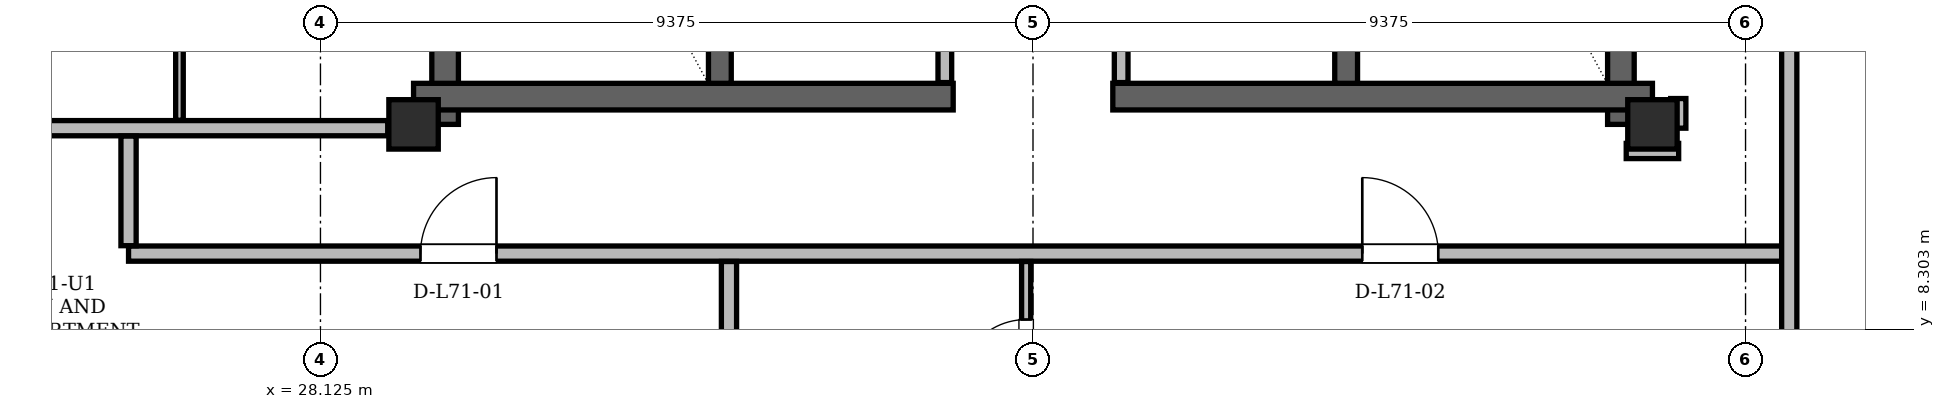
"""IFC4 building model, lengths in metres.
Left out: names, types, materials, properties, quantities, classifications, styles, units other than length and angle.
Written with IfcOpenShell. Run it as: python <this file> out.ifc"""

import sys

from ifc_helpers import new_model, si_unit, direction, frame, frame_2d, origin, origin_2d, place, context, subcontext, project, spatial, rectangle, hollow_rectangle, extrude, element, fill, save


model = new_model("IFC4")
c1 = context("Model", 3, precision=1e-05, world=origin(), true_north=direction((0.0, 1.0)))
c2 = subcontext(c1, "Body", "Model", "MODEL_VIEW")
j1 = project(units=[si_unit("LENGTHUNIT", "METRE"), si_unit("PLANEANGLEUNIT", "RADIAN")], contexts=[c1])
p1 = place(None, origin())
s1 = spatial("IfcSite", under=j1, at=p1, CompositionType="ELEMENT")
p2 = place(p1, origin())
s2 = spatial("IfcBuilding", under=s1, at=p2, CompositionType="ELEMENT")
p3 = place(p2, frame((0.0, 0.0, 269.4)))
s3 = spatial("IfcBuildingStorey", under=s2, at=p3, CompositionType="ELEMENT", Elevation=269.4)
for number, where, z_axis, x_axis in (
    (1, (29.35, 11.0, 0.0), (0.0, 0.0, 1.0), (1.0, 0.0, 0.0)),
    (2, (45.65, 11.0, 0.0), (0.0, 0.0, 1.0), (1.0, 0.0, 0.0)),
):
    element("IfcColumn", number, at=place(p3, frame(where, z_axis=z_axis, x_axis=x_axis)), inside=s3, PredefinedType="COLUMN", context=c2, shape_type="SweptSolid", body=[
        extrude(hollow_rectangle(XDim=0.65, YDim=0.65, WallThickness=0.05, at=origin_2d()), origin(), (0.0, 0.0, 1.0), 3.9),
    ])
for number, where, z_axis, x_axis in (
    (3, (29.765, 11.0, 0.0), (0.0, 0.0, 1.0), (0.0, 1.0, 0.0)),
    (4, (45.235, 11.0, 0.0), (0.0, 0.0, 1.0), (0.0, 1.0, 0.0)),
):
    element("IfcWall", number, at=place(p3, frame(where, z_axis=z_axis, x_axis=x_axis)), inside=s3, PredefinedType="SHEAR", context=c2, shape_type="SweptSolid", body=[
        extrude(rectangle(XDim=13.3, YDim=0.35, at=frame_2d((6.65, 0.0))), origin(), (0.0, 0.0, 1.0), 3.68),
    ])
for number, where, z_axis, x_axis in (
    (5, (29.35, 11.365, 0.0), (0.0, 0.0, 1.0), (1.0, 0.0, 0.0)),
    (6, (38.55, 11.365, 0.0), (0.0, 0.0, 1.0), (1.0, 0.0, 0.0)),
):
    element("IfcWall", number, at=place(p3, frame(where, z_axis=z_axis, x_axis=x_axis)), inside=s3, PredefinedType="SHEAR", context=c2, shape_type="SweptSolid", body=[
        extrude(rectangle(XDim=7.1, YDim=0.35, at=frame_2d((3.55, 0.0))), origin(), (0.0, 0.0, 1.0), 3.68),
    ])
for number, where, z_axis, x_axis in (
    (7, (33.38, 11.54, 0.0), (0.0, 0.0, 1.0), (0.0, 1.0, 0.0)),
    (8, (41.62, 11.54, 0.0), (0.0, 0.0, 1.0), (0.0, 1.0, 0.0)),
):
    element("IfcWall", number, at=place(p3, frame(where, z_axis=z_axis, x_axis=x_axis)), inside=s3, PredefinedType="SHEAR", context=c2, shape_type="SweptSolid", body=[
        extrude(rectangle(XDim=7.62, YDim=0.3, at=frame_2d((3.81, 0.0))), origin(), (0.0, 0.0, 1.0), 3.68),
    ])
p4 = place(p3, frame((58.572, 10.733, 0.0), z_axis=(0.0, 0.0, 1.0), x_axis=(-0.500001430823, 0.866024577697, 0.0)))
e9 = element("IfcWall", 9, at=p4, inside=s3, PredefinedType="SOLIDWALL", context=c2, shape_type="SweptSolid", body=[
    extrude(rectangle(XDim=37.296, YDim=0.29, at=frame_2d((18.648, 0.0))), origin(), (0.0, 0.0, 1.0), 3.058),
])
p5 = place(p4, frame((8.454, 0.0, 0.0)))
e10 = element("IfcOpeningElement", 10, at=p5, cuts=e9, PredefinedType="OPENING", context=c2, shape_type="SweptSolid", body=[
    extrude(rectangle(XDim=1.5, YDim=2.2, at=frame_2d((0.75, 1.1))), frame((0.0, 0.145, 0.0), z_axis=(0.0, -1.0, 0.0), x_axis=(1.0, 0.0, 0.0)), (0.0, 0.0, 1.0), 0.29),
])
p6 = place(p4, frame((28.796, 0.0, 0.0)))
e11 = element("IfcOpeningElement", 11, at=p6, cuts=e9, PredefinedType="OPENING", context=c2, shape_type="SweptSolid", body=[
    extrude(rectangle(XDim=1.5, YDim=2.2, at=frame_2d((0.75, 1.1))), frame((0.0, 0.145, 0.0), z_axis=(0.0, -1.0, 0.0), x_axis=(1.0, 0.0, 0.0)), (0.0, 0.0, 1.0), 0.29),
])
p7 = place(p4, frame((0.77, 0.0, 0.85)))
e12 = element("IfcOpeningElement", 12, at=p7, cuts=e9, PredefinedType="OPENING", context=c2, shape_type="SweptSolid", body=[
    extrude(rectangle(XDim=1.2, YDim=1.48, at=frame_2d((0.6, 0.74))), frame((0.0, 0.145, 0.0), z_axis=(0.0, -1.0, 0.0), x_axis=(1.0, 0.0, 0.0)), (0.0, 0.0, 1.0), 0.29),
])
p8 = place(p4, frame((2.285, 0.0, 0.85)))
e13 = element("IfcOpeningElement", 13, at=p8, cuts=e9, PredefinedType="OPENING", context=c2, shape_type="SweptSolid", body=[
    extrude(rectangle(XDim=1.2, YDim=1.48, at=frame_2d((0.6, 0.74))), frame((0.0, 0.145, 0.0), z_axis=(0.0, -1.0, 0.0), x_axis=(1.0, 0.0, 0.0)), (0.0, 0.0, 1.0), 0.29),
])
p9 = place(p4, frame((6.772, 0.0, 0.85)))
e14 = element("IfcOpeningElement", 14, at=p9, cuts=e9, PredefinedType="OPENING", context=c2, shape_type="SweptSolid", body=[
    extrude(rectangle(XDim=1.2, YDim=1.48, at=frame_2d((0.6, 0.74))), frame((0.0, 0.145, 0.0), z_axis=(0.0, -1.0, 0.0), x_axis=(1.0, 0.0, 0.0)), (0.0, 0.0, 1.0), 0.29),
])
p10 = place(p4, frame((12.682, 0.0, 0.85)))
e15 = element("IfcOpeningElement", 15, at=p10, cuts=e9, PredefinedType="OPENING", context=c2, shape_type="SweptSolid", body=[
    extrude(rectangle(XDim=3.0, YDim=2.098, at=frame_2d((1.5, 1.049))), frame((0.0, 0.145, 0.0), z_axis=(0.0, -1.0, 0.0), x_axis=(1.0, 0.0, 0.0)), (0.0, 0.0, 1.0), 0.29),
])
p11 = place(p4, frame((17.842, 0.0, 0.85)))
e16 = element("IfcOpeningElement", 16, at=p11, cuts=e9, PredefinedType="OPENING", context=c2, shape_type="SweptSolid", body=[
    extrude(rectangle(XDim=2.6, YDim=1.95, at=frame_2d((1.3, 0.975))), frame((0.0, 0.145, 0.0), z_axis=(0.0, -1.0, 0.0), x_axis=(1.0, 0.0, 0.0)), (0.0, 0.0, 1.0), 0.29),
])
p12 = place(p4, frame((35.217, 0.0, 0.85)))
e17 = element("IfcOpeningElement", 17, at=p12, cuts=e9, PredefinedType="OPENING", context=c2, shape_type="SweptSolid", body=[
    extrude(rectangle(XDim=1.2, YDim=1.48, at=frame_2d((0.6, 0.74))), frame((0.0, 0.145, 0.0), z_axis=(0.0, -1.0, 0.0), x_axis=(1.0, 0.0, 0.0)), (0.0, 0.0, 1.0), 0.29),
])
p13 = place(p4, frame((33.737, 0.0, 0.85)))
e18 = element("IfcOpeningElement", 18, at=p13, cuts=e9, PredefinedType="OPENING", context=c2, shape_type="SweptSolid", body=[
    extrude(rectangle(XDim=1.2, YDim=1.48, at=frame_2d((0.6, 0.74))), frame((0.0, 0.145, 0.0), z_axis=(0.0, -1.0, 0.0), x_axis=(1.0, 0.0, 0.0)), (0.0, 0.0, 1.0), 0.29),
])
p14 = place(p4, frame((22.775, 0.0, 0.85)))
e19 = element("IfcOpeningElement", 19, at=p14, cuts=e9, PredefinedType="OPENING", context=c2, shape_type="SweptSolid", body=[
    extrude(rectangle(XDim=1.2, YDim=1.48, at=frame_2d((0.6, 0.74))), frame((0.0, 0.145, 0.0), z_axis=(0.0, -1.0, 0.0), x_axis=(1.0, 0.0, 0.0)), (0.0, 0.0, 1.0), 0.29),
])
p15 = place(p4, frame((31.663, 0.0, 0.85)))
e20 = element("IfcOpeningElement", 20, at=p15, cuts=e9, PredefinedType="OPENING", context=c2, shape_type="SweptSolid", body=[
    extrude(rectangle(XDim=1.2, YDim=1.48, at=frame_2d((0.6, 0.74))), frame((0.0, 0.145, 0.0), z_axis=(0.0, -1.0, 0.0), x_axis=(1.0, 0.0, 0.0)), (0.0, 0.0, 1.0), 0.29),
])
p16 = place(p3, frame((35.076, 43.032, 0.0), z_axis=(0.0, 0.0, 1.0), x_axis=(-0.500001430823, -0.866024577697, 0.0)))
e21 = element("IfcWall", 21, at=p16, inside=s3, PredefinedType="SOLIDWALL", context=c2, shape_type="SweptSolid", body=[
    extrude(rectangle(XDim=37.296, YDim=0.29, at=frame_2d((18.648, 0.0))), origin(), (0.0, 0.0, 1.0), 3.058),
])
p17 = place(p16, frame((8.244, 0.0, 0.0)))
e22 = element("IfcOpeningElement", 22, at=p17, cuts=e21, PredefinedType="OPENING", context=c2, shape_type="SweptSolid", body=[
    extrude(rectangle(XDim=1.5, YDim=2.2, at=frame_2d((0.75, 1.1))), frame((0.0, 0.145, 0.0), z_axis=(0.0, -1.0, 0.0), x_axis=(1.0, 0.0, 0.0)), (0.0, 0.0, 1.0), 0.29),
])
p18 = place(p16, frame((29.006, 0.0, 0.0)))
e23 = element("IfcOpeningElement", 23, at=p18, cuts=e21, PredefinedType="OPENING", context=c2, shape_type="SweptSolid", body=[
    extrude(rectangle(XDim=1.5, YDim=2.2, at=frame_2d((0.75, 1.1))), frame((0.0, 0.145, 0.0), z_axis=(0.0, -1.0, 0.0), x_axis=(1.0, 0.0, 0.0)), (0.0, 0.0, 1.0), 0.29),
])
p19 = place(p16, frame((22.292, 0.0, 0.85)))
e24 = element("IfcOpeningElement", 24, at=p19, cuts=e21, PredefinedType="OPENING", context=c2, shape_type="SweptSolid", body=[
    extrude(rectangle(XDim=2.6, YDim=1.95, at=frame_2d((1.3, 0.975))), frame((0.0, 0.145, 0.0), z_axis=(0.0, -1.0, 0.0), x_axis=(1.0, 0.0, 0.0)), (0.0, 0.0, 1.0), 0.29),
])
p20 = place(p16, frame((33.833, 0.0, 0.85)))
e25 = element("IfcOpeningElement", 25, at=p20, cuts=e21, PredefinedType="OPENING", context=c2, shape_type="SweptSolid", body=[
    extrude(rectangle(XDim=2.4, YDim=1.9, at=frame_2d((1.2, 0.95))), frame((0.0, 0.145, 0.0), z_axis=(0.0, -1.0, 0.0), x_axis=(1.0, 0.0, 0.0)), (0.0, 0.0, 1.0), 0.29),
])
p21 = place(p16, frame((12.154, 0.0, 0.85)))
e26 = element("IfcOpeningElement", 26, at=p21, cuts=e21, PredefinedType="OPENING", context=c2, shape_type="SweptSolid", body=[
    extrude(rectangle(XDim=1.2, YDim=1.48, at=frame_2d((0.6, 0.74))), frame((0.0, 0.145, 0.0), z_axis=(0.0, -1.0, 0.0), x_axis=(1.0, 0.0, 0.0)), (0.0, 0.0, 1.0), 0.29),
])
p22 = place(p16, frame((16.612, 0.0, 0.85)))
e27 = element("IfcOpeningElement", 27, at=p22, cuts=e21, PredefinedType="OPENING", context=c2, shape_type="SweptSolid", body=[
    extrude(rectangle(XDim=1.6, YDim=1.7, at=frame_2d((0.8, 0.85))), frame((0.0, 0.145, 0.0), z_axis=(0.0, -1.0, 0.0), x_axis=(1.0, 0.0, 0.0)), (0.0, 0.0, 1.0), 0.29),
])
p23 = place(p16, frame((2.665, 0.0, 0.85)))
e28 = element("IfcOpeningElement", 28, at=p23, cuts=e21, PredefinedType="OPENING", context=c2, shape_type="SweptSolid", body=[
    extrude(rectangle(XDim=2.0, YDim=1.8, at=frame_2d((1.0, 0.9))), frame((0.0, 0.145, 0.0), z_axis=(0.0, -1.0, 0.0), x_axis=(1.0, 0.0, 0.0)), (0.0, 0.0, 1.0), 0.29),
])
p24 = place(p3, frame((36.34, 11.55, 0.0), z_axis=(0.0, 0.0, 1.0), x_axis=(0.0, 1.0, 0.0)))
e29 = element("IfcWall", 29, at=p24, inside=s3, PredefinedType="PARTITIONING", context=c2, shape_type="SweptSolid", body=[
    extrude(rectangle(XDim=5.55, YDim=0.18, at=frame_2d((2.775, 0.0))), origin(), (0.0, 0.0, 1.0), 3.68),
])
p25 = place(p24, frame((0.55, 0.0, 0.0)))
e30 = element("IfcOpeningElement", 30, at=p25, cuts=e29, PredefinedType="OPENING", context=c2, shape_type="SweptSolid", body=[
    extrude(rectangle(XDim=0.88, YDim=2.08, at=frame_2d((0.44, 1.04))), frame((0.0, 0.09, 0.0), z_axis=(0.0, -1.0, 0.0), x_axis=(1.0, 0.0, 0.0)), (0.0, 0.0, 1.0), 0.18),
])
p26 = place(p24, frame((3.25, 0.0, 0.0)))
e31 = element("IfcOpeningElement", 31, at=p26, cuts=e29, PredefinedType="OPENING", context=c2, shape_type="SweptSolid", body=[
    extrude(rectangle(XDim=0.88, YDim=2.08, at=frame_2d((0.44, 1.04))), frame((0.0, 0.09, 0.0), z_axis=(0.0, -1.0, 0.0), x_axis=(1.0, 0.0, 0.0)), (0.0, 0.0, 1.0), 0.18),
])
p27 = place(p3, frame((38.66, 11.55, 0.0), z_axis=(0.0, 0.0, 1.0), x_axis=(0.0, 1.0, 0.0)))
e32 = element("IfcWall", 32, at=p27, inside=s3, PredefinedType="PARTITIONING", context=c2, shape_type="SweptSolid", body=[
    extrude(rectangle(XDim=5.55, YDim=0.18, at=frame_2d((2.775, 0.0))), origin(), (0.0, 0.0, 1.0), 3.68),
])
p28 = place(p27, frame((1.35, 0.0, 0.0)))
e33 = element("IfcOpeningElement", 33, at=p28, cuts=e32, PredefinedType="OPENING", context=c2, shape_type="SweptSolid", body=[
    extrude(rectangle(XDim=0.88, YDim=2.08, at=frame_2d((0.44, 1.04))), frame((0.0, 0.09, 0.0), z_axis=(0.0, -1.0, 0.0), x_axis=(1.0, 0.0, 0.0)), (0.0, 0.0, 1.0), 0.18),
])
p29 = place(p27, frame((4.1, 0.0, 0.0)))
e34 = element("IfcOpeningElement", 34, at=p29, cuts=e32, PredefinedType="OPENING", context=c2, shape_type="SweptSolid", body=[
    extrude(rectangle(XDim=0.88, YDim=2.08, at=frame_2d((0.44, 1.04))), frame((0.0, 0.09, 0.0), z_axis=(0.0, -1.0, 0.0), x_axis=(1.0, 0.0, 0.0)), (0.0, 0.0, 1.0), 0.18),
])
p30 = place(p3, frame((25.6, 9.3, 0.0), z_axis=(0.0, 0.0, 1.0), x_axis=(1.0, 0.0, 0.0)))
e35 = element("IfcWall", 35, at=p30, inside=s3, PredefinedType="PARTITIONING", context=c2, shape_type="SweptSolid", body=[
    extrude(rectangle(XDim=21.85, YDim=0.2, at=frame_2d((10.925, 0.0))), origin(), (0.0, 0.0, 1.0), 3.68),
])
p31 = place(p30, frame((3.841, 0.0, 0.0)))
e36 = element("IfcOpeningElement", 36, at=p31, cuts=e35, PredefinedType="OPENING", context=c2, shape_type="SweptSolid", body=[
    extrude(rectangle(XDim=1.0, YDim=2.18, at=frame_2d((0.5, 1.09))), frame((0.0, 0.1, 0.0), z_axis=(0.0, -1.0, 0.0), x_axis=(1.0, 0.0, 0.0)), (0.0, 0.0, 1.0), 0.2),
])
p32 = place(p30, frame((16.232, 0.0, 0.0)))
e37 = element("IfcOpeningElement", 37, at=p32, cuts=e35, PredefinedType="OPENING", context=c2, shape_type="SweptSolid", body=[
    extrude(rectangle(XDim=1.0, YDim=2.18, at=frame_2d((0.5, 1.09))), frame((0.0, 0.1, 0.0), z_axis=(0.0, -1.0, 0.0), x_axis=(1.0, 0.0, 0.0)), (0.0, 0.0, 1.0), 0.2),
])
p33 = place(p3, frame((45.305, 10.65, 0.0), z_axis=(0.0, 0.0, 1.0), x_axis=(1.0, 0.0, 0.0)))
e38 = element("IfcWall", 38, at=p33, inside=s3, PredefinedType="PARTITIONING", context=c2, shape_type="SweptSolid", body=[
    extrude(rectangle(XDim=0.69, YDim=0.2, at=frame_2d((0.345, 0.0))), origin(), (0.0, 0.0, 1.0), 3.68),
])
p34 = place(p3, frame((16.763, 10.95, 0.0), z_axis=(0.0, 0.0, 1.0), x_axis=(1.0, 0.0, 0.0)))
e39 = element("IfcWall", 39, at=p34, inside=s3, PredefinedType="PARTITIONING", context=c2, shape_type="SweptSolid", body=[
    extrude(rectangle(XDim=12.247, YDim=0.2, at=frame_2d((6.124, 0.0))), origin(), (0.0, 0.0, 1.0), 3.266),
])
p35 = place(p3, frame((25.6, 9.404, 0.0), z_axis=(0.0, 0.0, 1.0), x_axis=(0.0, 1.0, 0.0)))
e40 = element("IfcWall", 40, at=p35, inside=s3, PredefinedType="PARTITIONING", context=c2, shape_type="SweptSolid", body=[
    extrude(rectangle(XDim=1.442, YDim=0.2, at=frame_2d((0.721, 0.0))), origin(), (0.0, 0.0, 1.0), 3.68),
])
p36 = place(p3, frame((26.27, 11.054, 0.0), z_axis=(0.0, 0.0, 1.0), x_axis=(0.0, 1.0, 0.0)))
e41 = element("IfcWall", 41, at=p36, inside=s3, PredefinedType="PARTITIONING", context=c2, shape_type="SweptSolid", body=[
    extrude(rectangle(XDim=2.762, YDim=0.1, at=frame_2d((1.381, 0.0))), origin(), (0.0, 0.0, 1.0), 3.68),
])
p37 = place(p3, frame((33.5, 6.684, 0.0), z_axis=(0.0, 0.0, 1.0), x_axis=(0.0, 1.0, 0.0)))
e42 = element("IfcWall", 42, at=p37, inside=s3, PredefinedType="PARTITIONING", context=c2, shape_type="SweptSolid", body=[
    extrude(rectangle(XDim=2.512, YDim=0.2, at=frame_2d((1.256, 0.0))), origin(), (0.0, 0.0, 1.0), 3.68),
])
p38 = place(p3, frame((37.41, 6.684, 0.0), z_axis=(0.0, 0.0, 1.0), x_axis=(0.0, 1.0, 0.0)))
e43 = element("IfcWall", 43, at=p38, inside=s3, PredefinedType="PARTITIONING", context=c2, shape_type="SweptSolid", body=[
    extrude(rectangle(XDim=2.512, YDim=0.12, at=frame_2d((1.256, 0.0))), origin(), (0.0, 0.0, 1.0), 3.68),
])
p39 = place(p38, frame((0.869, 0.0, 0.0)))
e44 = element("IfcOpeningElement", 44, at=p39, cuts=e43, PredefinedType="OPENING", context=c2, shape_type="SweptSolid", body=[
    extrude(rectangle(XDim=0.88, YDim=2.08, at=frame_2d((0.44, 1.04))), frame((0.0, 0.06, 0.0), z_axis=(0.0, -1.0, 0.0), x_axis=(1.0, 0.0, 0.0)), (0.0, 0.0, 1.0), 0.12),
])
p40 = place(p3, frame((45.99, 10.95, 0.0), z_axis=(0.0, 0.0, 1.0), x_axis=(0.0, 1.0, 0.0)))
e45 = element("IfcWall", 45, at=p40, inside=s3, PredefinedType="PARTITIONING", context=c2, shape_type="SweptSolid", body=[
    extrude(rectangle(XDim=0.39, YDim=0.2, at=frame_2d((0.195, 0.0))), origin(), (0.0, 0.0, 1.0), 3.68),
])
p41 = place(p3, frame((47.45, 6.684, 0.0), z_axis=(0.0, 0.0, 1.0), x_axis=(0.0, 1.0, 0.0)))
e46 = element("IfcWall", 46, at=p41, inside=s3, PredefinedType="PARTITIONING", context=c2, shape_type="SweptSolid", body=[
    extrude(rectangle(XDim=23.015, YDim=0.2, at=frame_2d((11.507, 0.0))), origin(), (0.0, 0.0, 1.0), 3.058),
])
p42 = place(p41, frame((7.212, 0.0, 0.0)))
e47 = element("IfcOpeningElement", 47, at=p42, cuts=e46, PredefinedType="OPENING", context=c2, shape_type="SweptSolid", body=[
    extrude(rectangle(XDim=1.0, YDim=2.18, at=frame_2d((0.5, 1.09))), frame((0.0, 0.1, 0.0), z_axis=(0.0, -1.0, 0.0), x_axis=(1.0, 0.0, 0.0)), (0.0, 0.0, 1.0), 0.2),
])
p43 = place(p41, frame((15.198, 0.0, 0.0)))
e48 = element("IfcOpeningElement", 48, at=p43, cuts=e46, PredefinedType="OPENING", context=c2, shape_type="SweptSolid", body=[
    extrude(rectangle(XDim=1.0, YDim=2.18, at=frame_2d((0.5, 1.09))), frame((0.0, 0.1, 0.0), z_axis=(0.0, -1.0, 0.0), x_axis=(1.0, 0.0, 0.0)), (0.0, 0.0, 1.0), 0.2),
])
p44 = place(p31, origin())
e49 = element("IfcDoor", 49, at=p44, inside=s3, OperationType="SINGLE_SWING_RIGHT", PredefinedType="DOOR", context=c2, shape_type="SweptSolid", body=[
    extrude(rectangle(XDim=1.0, YDim=2.18, at=frame_2d((0.5, 1.09))), frame((0.0, 0.025, 0.0), z_axis=(0.0, -1.0, 0.0), x_axis=(1.0, 0.0, 0.0)), (0.0, 0.0, 1.0), 0.05),
])
fill(e36, e49)
p45 = place(p32, origin())
e50 = element("IfcDoor", 50, at=p45, inside=s3, OperationType="SINGLE_SWING_LEFT", PredefinedType="DOOR", context=c2, shape_type="SweptSolid", body=[
    extrude(rectangle(XDim=1.0, YDim=2.18, at=frame_2d((0.5, 1.09))), frame((0.0, 0.025, 0.0), z_axis=(0.0, -1.0, 0.0), x_axis=(1.0, 0.0, 0.0)), (0.0, 0.0, 1.0), 0.05),
])
fill(e37, e50)
p46 = place(p39, origin())
e51 = element("IfcDoor", 51, at=p46, inside=s3, OperationType="SINGLE_SWING_LEFT", PredefinedType="DOOR", context=c2, shape_type="SweptSolid", body=[
    extrude(rectangle(XDim=0.88, YDim=2.08, at=frame_2d((0.44, 1.04))), frame((0.0, 0.025, 0.0), z_axis=(0.0, -1.0, 0.0), x_axis=(1.0, 0.0, 0.0)), (0.0, 0.0, 1.0), 0.05),
])
fill(e44, e51)
save(model, sys.argv[1])
